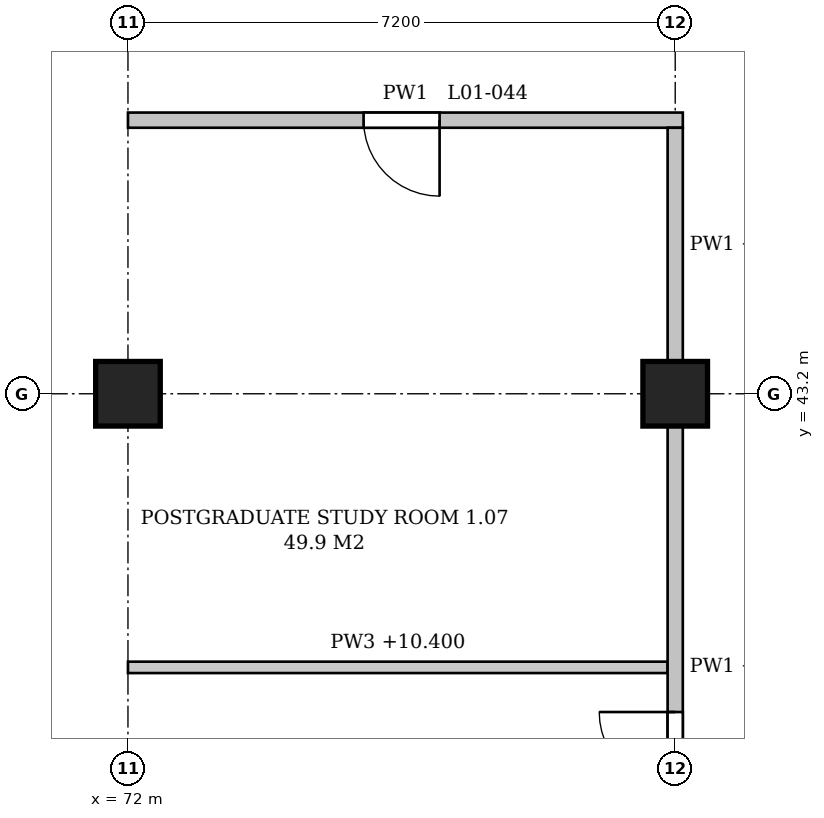
"""IFC4 building model, lengths in metres.
Left out: names, types, materials, properties, quantities, classifications, styles, units other than length and angle.
Written with IfcOpenShell. Run it as: python <this file> out.ifc"""

import sys

from ifc_helpers import new_model, si_unit, direction, frame, frame_2d, origin, origin_2d, place, context, subcontext, project, spatial, polyline, rectangle, outline, extrude, element, fill, save


model = new_model("IFC4")
c1 = context("Model", 3, precision=1e-05, world=origin(), true_north=direction((0.0, 1.0)))
c2 = subcontext(c1, "Body", "Model", "MODEL_VIEW")
j1 = project(units=[si_unit("LENGTHUNIT", "METRE"), si_unit("PLANEANGLEUNIT", "RADIAN")], contexts=[c1])
p1 = place(None, origin())
s1 = spatial("IfcSite", under=j1, at=p1, CompositionType="ELEMENT")
p2 = place(p1, origin())
s2 = spatial("IfcBuilding", under=s1, at=p2, CompositionType="ELEMENT")
p3 = place(p2, frame((0.0, 0.0, 6.0)))
s3 = spatial("IfcBuildingStorey", under=s2, at=p3, CompositionType="ELEMENT", Elevation=6.0)
for number, where, z_axis, x_axis in (
    (1, (72.0, 43.2, 0.0), (0.0, 0.0, 1.0), (1.0, 0.0, 0.0)),
    (2, (79.2, 43.2, 0.0), (0.0, 0.0, 1.0), (1.0, 0.0, 0.0)),
):
    element("IfcColumn", number, at=place(p3, frame(where, z_axis=z_axis, x_axis=x_axis)), inside=s3, PredefinedType="COLUMN", context=c2, shape_type="SweptSolid", body=[
        extrude(rectangle(XDim=0.85, YDim=0.85, at=origin_2d()), origin(), (0.0, 0.0, 1.0), 5.4),
    ])
p4 = place(p2, origin())
s4 = spatial("IfcBuildingStorey", under=s2, at=p4, CompositionType="ELEMENT", Elevation=0.0)
p5 = place(p4, frame((71.8, 36.425, 0.0), z_axis=(0.0, 0.0, 1.0), x_axis=(0.0, 1.0, 0.0)))
e3 = element("IfcWall", 3, at=p5, inside=s4, PredefinedType="SOLIDWALL", context=c2, shape_type="SweptSolid", body=[
    extrude(rectangle(XDim=6.35, YDim=0.4, at=frame_2d((3.175, 0.0))), origin(), (0.0, 0.0, 1.0), 10.55),
])
p6 = place(p4, frame((71.8, 43.625, 0.0), z_axis=(0.0, 0.0, 1.0), x_axis=(0.0, 1.0, 0.0)))
e4 = element("IfcWall", 4, at=p6, inside=s4, PredefinedType="SOLIDWALL", context=c2, shape_type="SweptSolid", body=[
    extrude(rectangle(XDim=6.35, YDim=0.4, at=frame_2d((3.175, 0.0))), origin(), (0.0, 0.0, 1.0), 10.55),
])
p7 = place(p3, frame((72.0, 39.6, 0.0), z_axis=(0.0, 0.0, 1.0), x_axis=(1.0, 0.0, 0.0)))
e5 = element("IfcWall", 5, at=p7, inside=s3, PredefinedType="PARTITIONING", context=c2, shape_type="SweptSolid", body=[
    extrude(rectangle(XDim=7.1, YDim=0.15, at=frame_2d((3.55, 0.0))), origin(), (0.0, 0.0, 1.0), 4.4),
])
p8 = place(p3, frame((72.0, 46.8, 0.0), z_axis=(0.0, 0.0, 1.0), x_axis=(1.0, 0.0, 0.0)))
e6 = element("IfcWall", 6, at=p8, inside=s3, PredefinedType="PARTITIONING", context=c2, shape_type="SweptSolid", body=[
    extrude(outline(polyline([(0.0, 0.0), (7.3, 0.0), (7.3, 4.4), (6.95, 4.4), (6.95, 4.7), (0.25, 4.7), (0.25, 4.55), (0.0, 4.55), (0.0, 0.0)])), frame((0.0, 0.1, 0.0), z_axis=(0.0, -1.0, 0.0), x_axis=(1.0, 0.0, 0.0)), (0.0, 0.0, 1.0), 0.2),
])
p9 = place(p8, frame((3.1, 0.0, 0.0)))
e7 = element("IfcOpeningElement", 7, at=p9, cuts=e6, PredefinedType="OPENING", context=c2, shape_type="SweptSolid", body=[
    extrude(rectangle(XDim=1.0, YDim=2.1, at=frame_2d((0.5, 1.05))), frame((0.0, 0.11, 0.0), z_axis=(0.0, -1.0, 0.0), x_axis=(1.0, 0.0, 0.0)), (0.0, 0.0, 1.0), 0.22),
])
p10 = place(p3, frame((79.2, 36.425, 0.0), z_axis=(0.0, 0.0, 1.0), x_axis=(0.0, 1.0, 0.0)))
e8 = element("IfcWall", 8, at=p10, inside=s3, PredefinedType="PARTITIONING", context=c2, shape_type="SweptSolid", body=[
    extrude(rectangle(XDim=6.35, YDim=0.2, at=frame_2d((3.175, 0.0))), origin(), (0.0, 0.0, 1.0), 4.4),
])
p11 = place(p10, frame((0.587, 0.0, 0.0)))
e9 = element("IfcOpeningElement", 9, at=p11, cuts=e8, PredefinedType="OPENING", context=c2, shape_type="SweptSolid", body=[
    extrude(rectangle(XDim=2.0, YDim=2.1, at=frame_2d((1.0, 1.05))), frame((0.0, 0.11, 0.0), z_axis=(0.0, -1.0, 0.0), x_axis=(1.0, 0.0, 0.0)), (0.0, 0.0, 1.0), 0.22),
])
p12 = place(p3, frame((79.2, 43.625, 0.0), z_axis=(0.0, 0.0, 1.0), x_axis=(0.0, 1.0, 0.0)))
e10 = element("IfcWall", 10, at=p12, inside=s3, PredefinedType="PARTITIONING", context=c2, shape_type="SweptSolid", body=[
    extrude(rectangle(XDim=3.075, YDim=0.2, at=frame_2d((1.538, 0.0))), origin(), (0.0, 0.0, 1.0), 4.4),
])
p13 = place(p11, origin())
e11 = element("IfcDoor", 11, at=p13, inside=s3, OperationType="DOUBLE_DOOR_SINGLE_SWING", PredefinedType="DOOR", context=c2, shape_type="SweptSolid", body=[
    extrude(rectangle(XDim=2.0, YDim=2.1, at=frame_2d((1.0, 1.05))), frame((0.0, 0.025, 0.0), z_axis=(0.0, -1.0, 0.0), x_axis=(1.0, 0.0, 0.0)), (0.0, 0.0, 1.0), 0.05),
])
fill(e9, e11)
p14 = place(p9, frame((1.0, 0.0, 0.0), z_axis=(0.0, 0.0, 1.0), x_axis=(-1.0, 0.0, 0.0)))
e12 = element("IfcDoor", 12, at=p14, inside=s3, OperationType="SINGLE_SWING_LEFT", PredefinedType="DOOR", context=c2, shape_type="SweptSolid", body=[
    extrude(rectangle(XDim=1.0, YDim=2.1, at=frame_2d((0.5, 1.05))), frame((0.0, 0.025, 0.0), z_axis=(0.0, -1.0, 0.0), x_axis=(1.0, 0.0, 0.0)), (0.0, 0.0, 1.0), 0.05),
])
fill(e7, e12)
save(model, sys.argv[1])
